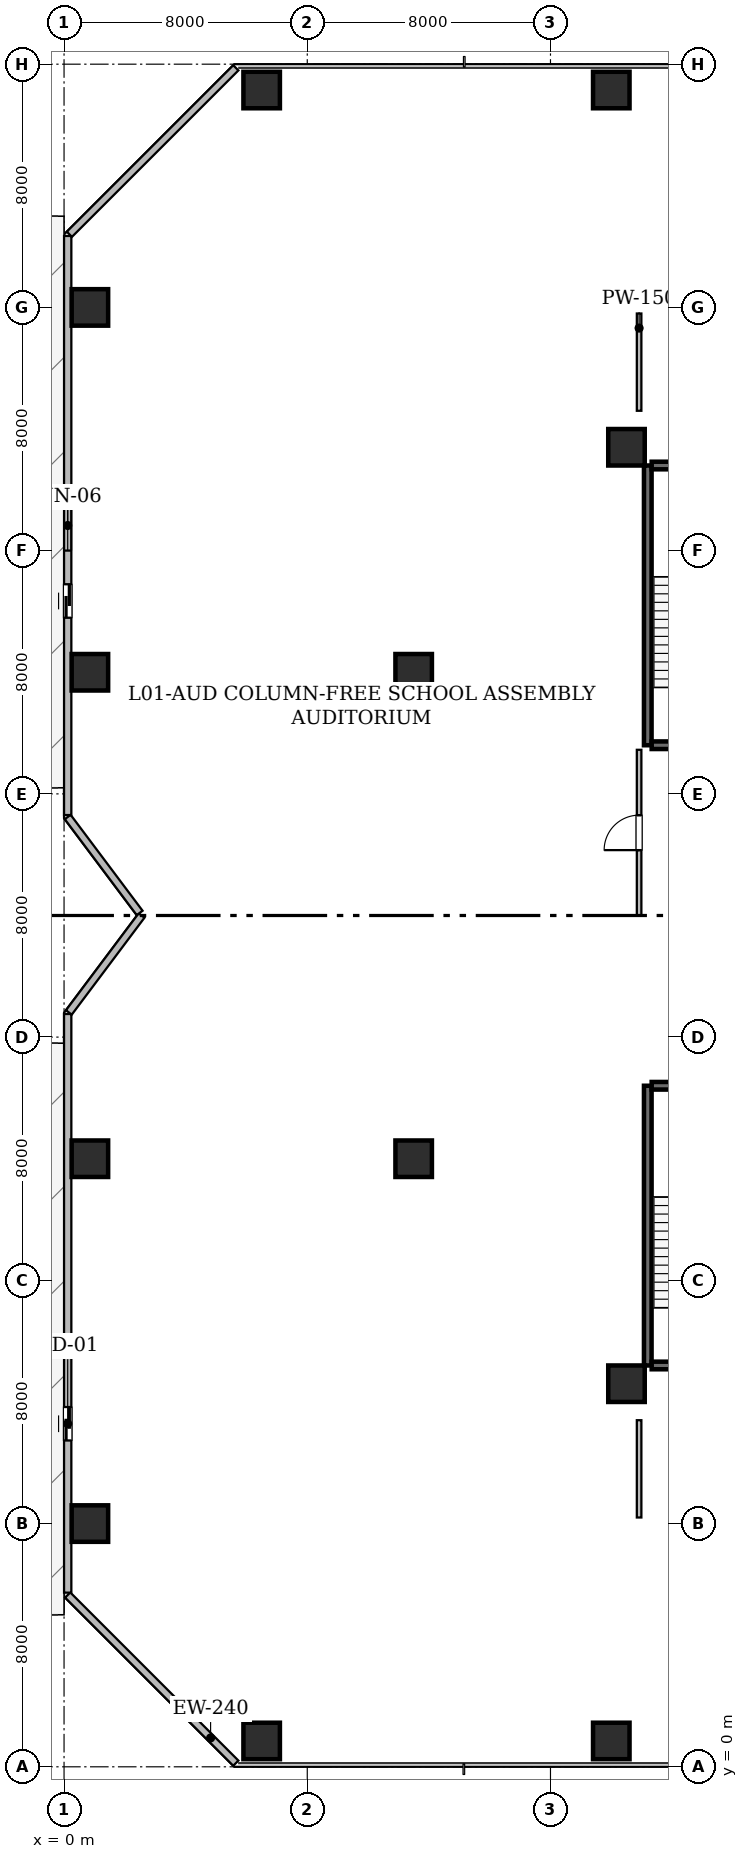
"""IFC4 building model, lengths in metres.
Left out: names, types, materials, properties, quantities, classifications, styles, units other than length and angle.
Written with IfcOpenShell. Run it as: python <this file> out.ifc"""

import sys

from ifc_helpers import new_model, si_unit, direction, frame, frame_2d, origin, origin_2d, place, context, subcontext, project, spatial, rectangle, hollow_rectangle, extrude, element, fill, save


model = new_model("IFC4")
c1 = context("Model", 3, precision=1e-05, world=origin(), true_north=direction((0.0, 1.0)))
c2 = subcontext(c1, "Body", "Model", "MODEL_VIEW")
j1 = project(units=[si_unit("LENGTHUNIT", "METRE"), si_unit("PLANEANGLEUNIT", "RADIAN")], contexts=[c1])
p1 = place(None, origin())
s1 = spatial("IfcSite", under=j1, at=p1, CompositionType="ELEMENT")
p2 = place(p1, origin())
s2 = spatial("IfcBuilding", under=s1, at=p2, CompositionType="ELEMENT")
p3 = place(p2, frame((0.0, 0.0, 7.2)))
s3 = spatial("IfcBuildingStorey", under=s2, at=p3, CompositionType="ELEMENT", Elevation=7.2)
for number, where, z_axis, x_axis in (
    (1, (6.5, 0.85, 0.0), (0.0, 0.0, 1.0), (1.0, 0.0, 0.0)),
    (2, (18.0, 0.85, 0.0), (0.0, 0.0, 1.0), (1.0, 0.0, 0.0)),
    (3, (6.5, 55.15, 0.0), (0.0, 0.0, 1.0), (1.0, 0.0, 0.0)),
    (4, (18.0, 55.15, 0.0), (0.0, 0.0, 1.0), (1.0, 0.0, 0.0)),
    (5, (0.85, 8.0, 0.0), (0.0, 0.0, 1.0), (1.0, 0.0, 0.0)),
    (6, (0.85, 20.0, 0.0), (0.0, 0.0, 1.0), (1.0, 0.0, 0.0)),
    (7, (0.85, 36.0, 0.0), (0.0, 0.0, 1.0), (1.0, 0.0, 0.0)),
    (8, (0.85, 48.0, 0.0), (0.0, 0.0, 1.0), (1.0, 0.0, 0.0)),
    (9, (18.5, 12.6, 0.0), (0.0, 0.0, 1.0), (1.0, 0.0, 0.0)),
    (10, (18.5, 43.4, 0.0), (0.0, 0.0, 1.0), (1.0, 0.0, 0.0)),
    (11, (11.5, 20.0, 0.0), (0.0, 0.0, 1.0), (1.0, 0.0, 0.0)),
    (12, (11.5, 36.0, 0.0), (0.0, 0.0, 1.0), (1.0, 0.0, 0.0)),
):
    element("IfcColumn", number, at=place(p3, frame(where, z_axis=z_axis, x_axis=x_axis)), inside=s3, PredefinedType="COLUMN", context=c2, shape_type="SweptSolid", body=[
        extrude(hollow_rectangle(XDim=1.2, YDim=1.2, WallThickness=0.06, at=origin_2d()), origin(), (0.0, 0.0, 1.0), 4.8),
    ])
p4 = place(p3, frame((5.65, 0.12, 0.0), z_axis=(0.0, 0.0, 1.0), x_axis=(-0.707106781187, 0.707106781187, 0.0)))
e13 = element("IfcWall", 13, at=p4, inside=s3, PredefinedType="STANDARD", context=c2, shape_type="SweptSolid", body=[
    extrude(rectangle(XDim=7.82, YDim=0.24, at=frame_2d((3.91, 0.0))), origin(), (0.0, 0.0, 1.0), 4.48),
])
p5 = place(p3, frame((0.12, 5.728, 0.0), z_axis=(0.0, 0.0, 1.0), x_axis=(0.0, 1.0, 0.0)))
e14 = element("IfcWall", 14, at=p5, inside=s3, PredefinedType="STANDARD", context=c2, shape_type="SweptSolid", body=[
    extrude(rectangle(XDim=19.032, YDim=0.24, at=frame_2d((9.516, 0.0))), origin(), (0.0, 0.0, 1.0), 4.48),
])
p6 = place(p5, frame((5.005, 0.0, 0.0)))
e15 = element("IfcOpeningElement", 15, at=p6, cuts=e14, PredefinedType="OPENING", context=c2, shape_type="SweptSolid", body=[
    extrude(rectangle(XDim=1.1, YDim=2.2, at=frame_2d((0.55, 1.1))), frame((0.0, 0.13, 0.0), z_axis=(0.0, -1.0, 0.0), x_axis=(1.0, 0.0, 0.0)), (0.0, 0.0, 1.0), 0.26),
])
p7 = place(p3, frame((0.158, 24.811, 0.0), z_axis=(0.0, 0.0, 1.0), x_axis=(0.600058791648, 0.799955902889, 0.0)))
e16 = element("IfcWall", 16, at=p7, inside=s3, PredefinedType="STANDARD", context=c2, shape_type="SweptSolid", body=[
    extrude(rectangle(XDim=3.986, YDim=0.24, at=frame_2d((1.993, 0.0))), origin(), (0.0, 0.0, 1.0), 4.48),
])
p8 = place(p3, frame((2.487, 28.084, 0.0), z_axis=(0.0, 0.0, 1.0), x_axis=(-0.599990098106, 0.800007426325, 0.0)))
e17 = element("IfcWall", 17, at=p8, inside=s3, PredefinedType="STANDARD", context=c2, shape_type="SweptSolid", body=[
    extrude(rectangle(XDim=3.945, YDim=0.24, at=frame_2d((1.973, 0.0))), origin(), (0.0, 0.0, 1.0), 4.48),
])
p9 = place(p3, frame((0.12, 31.304, 0.0), z_axis=(0.0, 0.0, 1.0), x_axis=(0.0, 1.0, 0.0)))
e18 = element("IfcWall", 18, at=p9, inside=s3, PredefinedType="STANDARD", context=c2, shape_type="SweptSolid", body=[
    extrude(rectangle(XDim=19.046, YDim=0.24, at=frame_2d((9.523, 0.0))), origin(), (0.0, 0.0, 1.0), 4.48),
])
p10 = place(p9, frame((6.49, 0.0, 0.0)))
e19 = element("IfcOpeningElement", 19, at=p10, cuts=e18, PredefinedType="OPENING", context=c2, shape_type="SweptSolid", body=[
    extrude(rectangle(XDim=1.1, YDim=2.2, at=frame_2d((0.55, 1.1))), frame((0.0, 0.13, 0.0), z_axis=(0.0, -1.0, 0.0), x_axis=(1.0, 0.0, 0.0)), (0.0, 0.0, 1.0), 0.26),
])
p11 = place(p9, frame((8.698, 0.0, 0.85)))
e20 = element("IfcOpeningElement", 20, at=p11, cuts=e18, PredefinedType="OPENING", context=c2, shape_type="SweptSolid", body=[
    extrude(rectangle(XDim=1.65, YDim=1.55, at=frame_2d((0.825, 0.775))), frame((0.0, 0.13, 0.0), z_axis=(0.0, -1.0, 0.0), x_axis=(1.0, 0.0, 0.0)), (0.0, 0.0, 1.0), 0.26),
])
p12 = place(p3, frame((0.175, 50.405, 0.0), z_axis=(0.0, 0.0, 1.0), x_axis=(0.707106781187, 0.707106781187, 0.0)))
e21 = element("IfcWall", 21, at=p12, inside=s3, PredefinedType="STANDARD", context=c2, shape_type="SweptSolid", body=[
    extrude(rectangle(XDim=7.743, YDim=0.24, at=frame_2d((3.871, 0.0))), origin(), (0.0, 0.0, 1.0), 4.48),
])
p13 = place(p3, frame((19.2, 13.2, 0.0), z_axis=(0.0, 0.0, 1.0), x_axis=(0.0, 1.0, 0.0)))
e22 = element("IfcWall", 22, at=p13, inside=s3, PredefinedType="SHEAR", context=c2, shape_type="SweptSolid", body=[
    extrude(rectangle(XDim=9.2, YDim=0.25, at=frame_2d((4.6, 0.0))), origin(), (0.0, 0.0, 1.0), 4.48),
])
for number, where, z_axis, x_axis in (
    (23, (19.329, 13.2, 0.0), (0.0, 0.0, 1.0), (1.0, 0.0, 0.0)),
    (24, (19.329, 22.4, 0.0), (0.0, 0.0, 1.0), (1.0, 0.0, 0.0)),
):
    element("IfcWall", number, at=place(p3, frame(where, z_axis=z_axis, x_axis=x_axis)), inside=s3, PredefinedType="SHEAR", context=c2, shape_type="SweptSolid", body=[
        extrude(rectangle(XDim=3.692, YDim=0.25, at=frame_2d((1.846, 0.0))), origin(), (0.0, 0.0, 1.0), 4.48),
    ])
p14 = place(p3, frame((19.2, 33.6, 0.0), z_axis=(0.0, 0.0, 1.0), x_axis=(0.0, 1.0, 0.0)))
e25 = element("IfcWall", 25, at=p14, inside=s3, PredefinedType="SHEAR", context=c2, shape_type="SweptSolid", body=[
    extrude(rectangle(XDim=9.2, YDim=0.25, at=frame_2d((4.6, 0.0))), origin(), (0.0, 0.0, 1.0), 4.48),
])
for number, where, z_axis, x_axis in (
    (26, (19.329, 33.6, 0.0), (0.0, 0.0, 1.0), (1.0, 0.0, 0.0)),
    (27, (19.329, 42.8, 0.0), (0.0, 0.0, 1.0), (1.0, 0.0, 0.0)),
):
    element("IfcWall", number, at=place(p3, frame(where, z_axis=z_axis, x_axis=x_axis)), inside=s3, PredefinedType="SHEAR", context=c2, shape_type="SweptSolid", body=[
        extrude(rectangle(XDim=3.692, YDim=0.25, at=frame_2d((1.846, 0.0))), origin(), (0.0, 0.0, 1.0), 4.48),
    ])
p15 = place(p3, frame((18.915, 28.0, 0.0), z_axis=(0.0, 0.0, 1.0), x_axis=(0.0, 1.0, 0.0)))
e28 = element("IfcWall", 28, at=p15, inside=s3, PredefinedType="STANDARD", context=c2, shape_type="SweptSolid", body=[
    extrude(rectangle(XDim=5.45, YDim=0.15, at=frame_2d((2.725, 0.0))), origin(), (0.0, 0.0, 1.0), 4.48),
])
p16 = place(p15, frame((2.15, 0.0, 0.0)))
e29 = element("IfcOpeningElement", 29, at=p16, cuts=e28, PredefinedType="OPENING", context=c2, shape_type="SweptSolid", body=[
    extrude(rectangle(XDim=1.15, YDim=2.2, at=frame_2d((0.575, 1.1))), frame((0.0, 0.085, 0.0), z_axis=(0.0, -1.0, 0.0), x_axis=(1.0, 0.0, 0.0)), (0.0, 0.0, 1.0), 0.17),
])
for number, where, z_axis, x_axis in (
    (30, (18.915, 44.6, 0.0), (0.0, 0.0, 1.0), (0.0, 1.0, 0.0)),
    (31, (18.915, 8.2, 0.0), (0.0, 0.0, 1.0), (0.0, 1.0, 0.0)),
):
    element("IfcWall", number, at=place(p3, frame(where, z_axis=z_axis, x_axis=x_axis)), inside=s3, PredefinedType="STANDARD", context=c2, shape_type="SweptSolid", body=[
        extrude(rectangle(XDim=3.2, YDim=0.15, at=frame_2d((1.6, 0.0))), origin(), (0.0, 0.0, 1.0), 4.48),
    ])
p17 = place(p6, origin())
e32 = element("IfcDoor", 32, at=p17, inside=s3, OperationType="SLIDING_TO_LEFT", PredefinedType="DOOR", context=c2, shape_type="SweptSolid", body=[
    extrude(rectangle(XDim=1.1, YDim=2.2, at=frame_2d((0.55, 1.1))), frame((0.0, 0.025, 0.0), z_axis=(0.0, -1.0, 0.0), x_axis=(1.0, 0.0, 0.0)), (0.0, 0.0, 1.0), 0.05),
])
fill(e15, e32)
p18 = place(p10, origin())
e33 = element("IfcDoor", 33, at=p18, inside=s3, OperationType="SLIDING_TO_LEFT", PredefinedType="DOOR", context=c2, shape_type="SweptSolid", body=[
    extrude(rectangle(XDim=1.1, YDim=2.2, at=frame_2d((0.55, 1.1))), frame((0.0, 0.025, 0.0), z_axis=(0.0, -1.0, 0.0), x_axis=(1.0, 0.0, 0.0)), (0.0, 0.0, 1.0), 0.05),
])
fill(e19, e33)
p19 = place(p11, origin())
e34 = element("IfcWindow", 34, at=p19, inside=s3, PartitioningType="SINGLE_PANEL", PredefinedType="WINDOW", context=c2, shape_type="SweptSolid", body=[
    extrude(rectangle(XDim=1.65, YDim=1.55, at=frame_2d((0.825, 0.775))), frame((0.0, 0.03, 0.0), z_axis=(0.0, -1.0, 0.0), x_axis=(1.0, 0.0, 0.0)), (0.0, 0.0, 1.0), 0.06),
])
fill(e20, e34)
p20 = place(p16, origin())
e35 = element("IfcDoor", 35, at=p20, inside=s3, OperationType="SINGLE_SWING_LEFT", PredefinedType="DOOR", context=c2, shape_type="SweptSolid", body=[
    extrude(rectangle(XDim=1.15, YDim=2.2, at=frame_2d((0.575, 1.1))), frame((0.0, 0.025, 0.0), z_axis=(0.0, -1.0, 0.0), x_axis=(1.0, 0.0, 0.0)), (0.0, 0.0, 1.0), 0.05),
])
fill(e29, e35)
save(model, sys.argv[1])
